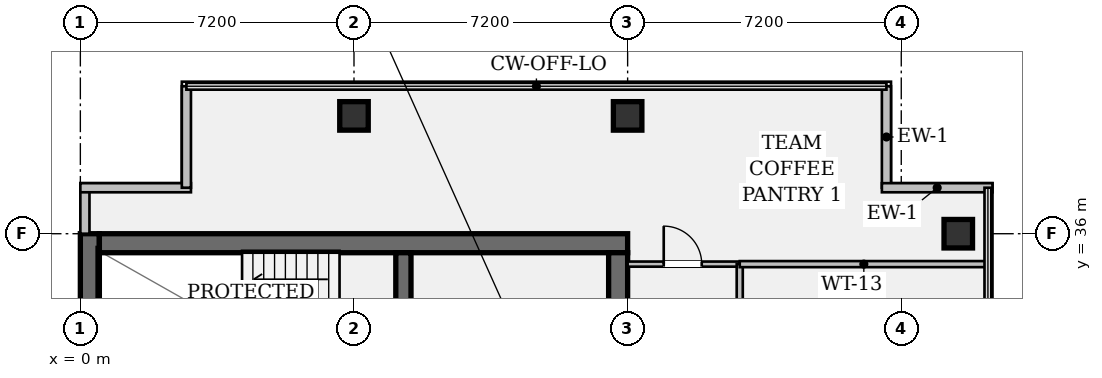
"""IFC4 building model, lengths in metres.
Left out: names, types, materials, properties, quantities, classifications, styles, units other than length and angle.
Written with IfcOpenShell. Run it as: python <this file> out.ifc"""

import sys

from ifc_helpers import new_model, si_unit, direction, frame, frame_2d, origin, origin_2d, place, context, subcontext, project, spatial, rectangle, hollow_rectangle, extrude, element, fill, save


model = new_model("IFC4")
c1 = context("Model", 3, precision=1e-05, world=origin(), true_north=direction((0.0, 1.0)))
c2 = subcontext(c1, "Body", "Model", "MODEL_VIEW")
j1 = project(units=[si_unit("LENGTHUNIT", "METRE"), si_unit("PLANEANGLEUNIT", "RADIAN")], contexts=[c1])
p1 = place(None, origin())
s1 = spatial("IfcSite", under=j1, at=p1, CompositionType="ELEMENT")
p2 = place(p1, origin())
s2 = spatial("IfcBuilding", under=s1, at=p2, CompositionType="ELEMENT")
p3 = place(p2, frame((0.0, 0.0, 222.25)))
s3 = spatial("IfcBuildingStorey", under=s2, at=p3, CompositionType="ELEMENT", Elevation=222.25)
p4 = place(p3, frame((0.25, 7.2, 0.0), z_axis=(0.0, 0.0, 1.0), x_axis=(0.0, 1.0, 0.0)))
e1 = element("IfcWall", 1, at=p4, inside=s3, PredefinedType="SHEAR", context=c2, shape_type="SweptSolid", body=[
    extrude(rectangle(XDim=28.8, YDim=0.5, at=frame_2d((14.4, 0.0))), origin(), (0.0, 0.0, 1.0), 3.24),
])
p5 = place(p3, frame((0.5, 35.75, 0.0), z_axis=(0.0, 0.0, 1.0), x_axis=(1.0, 0.0, 0.0)))
e2 = element("IfcWall", 2, at=p5, inside=s3, PredefinedType="SHEAR", context=c2, shape_type="SweptSolid", body=[
    extrude(rectangle(XDim=13.9, YDim=0.5, at=frame_2d((6.95, 0.0))), origin(), (0.0, 0.0, 1.0), 3.24),
])
p6 = place(p3, frame((14.15, 35.5, 0.0), z_axis=(0.0, 0.0, 1.0), x_axis=(0.0, -1.0, 0.0)))
e3 = element("IfcWall", 3, at=p6, inside=s3, PredefinedType="SHEAR", context=c2, shape_type="SweptSolid", body=[
    extrude(rectangle(XDim=27.8, YDim=0.5, at=frame_2d((13.9, 0.0))), origin(), (0.0, 0.0, 1.0), 3.24),
])
p7 = place(p6, frame((1.4, 0.0, 0.0)))
e4 = element("IfcOpeningElement", 4, at=p7, cuts=e3, PredefinedType="OPENING", context=c2, shape_type="SweptSolid", body=[
    extrude(rectangle(XDim=1.2, YDim=2.15, at=frame_2d((0.6, 1.075))), frame((0.0, 0.262, 0.0), z_axis=(0.0, -1.0, 0.0), x_axis=(1.0, 0.0, 0.0)), (0.0, 0.0, 1.0), 0.524),
])
p8 = place(p6, frame((25.35, 0.0, 0.0)))
e5 = element("IfcOpeningElement", 5, at=p8, cuts=e3, PredefinedType="OPENING", context=c2, shape_type="SweptSolid", body=[
    extrude(rectangle(XDim=1.2, YDim=2.15, at=frame_2d((0.6, 1.075))), frame((0.0, 0.262, 0.0), z_axis=(0.0, -1.0, 0.0), x_axis=(1.0, 0.0, 0.0)), (0.0, 0.0, 1.0), 0.524),
])
p9 = place(p6, frame((14.7, 0.0, 0.0)))
e6 = element("IfcOpeningElement", 6, at=p9, cuts=e3, PredefinedType="OPENING", context=c2, shape_type="SweptSolid", body=[
    extrude(rectangle(XDim=1.6, YDim=2.2, at=frame_2d((0.8, 1.1))), frame((0.0, 0.262, 0.0), z_axis=(0.0, -1.0, 0.0), x_axis=(1.0, 0.0, 0.0)), (0.0, 0.0, 1.0), 0.524),
])
p10 = place(p3, frame((8.5, 31.72, 0.0), z_axis=(0.0, 0.0, 1.0), x_axis=(0.0, 1.0, 0.0)))
e7 = element("IfcWall", 7, at=p10, inside=s3, PredefinedType="SHEAR", context=c2, shape_type="SweptSolid", body=[
    extrude(rectangle(XDim=3.78, YDim=0.4, at=frame_2d((1.89, 0.0))), origin(), (0.0, 0.0, 1.0), 3.24),
])
p11 = place(p10, frame((0.9, 0.0, 0.0)))
e8 = element("IfcOpeningElement", 8, at=p11, cuts=e7, PredefinedType="OPENING", context=c2, shape_type="SweptSolid", body=[
    extrude(rectangle(XDim=1.1, YDim=2.15, at=frame_2d((0.55, 1.075))), frame((0.0, 0.212, 0.0), z_axis=(0.0, -1.0, 0.0), x_axis=(1.0, 0.0, 0.0)), (0.0, 0.0, 1.0), 0.424),
])
for number, where, z_axis, x_axis in (
    (9, (7.2, 39.1, 0.0), (0.0, 0.0, 1.0), (1.0, 0.0, 0.0)),
    (10, (14.4, 39.1, 0.0), (0.0, 0.0, 1.0), (1.0, 0.0, 0.0)),
    (11, (23.1, 36.0, 0.0), (0.0, 0.0, 1.0), (1.0, 0.0, 0.0)),
):
    element("IfcColumn", number, at=place(p3, frame(where, z_axis=z_axis, x_axis=x_axis)), inside=s3, PredefinedType="COLUMN", context=c2, shape_type="SweptSolid", body=[
        extrude(hollow_rectangle(XDim=0.75, YDim=0.75, WallThickness=0.045, at=origin_2d()), origin(), (0.0, 0.0, 1.0), 3.24),
    ])
p12 = place(p3, frame((0.12, 36.0, 0.0), z_axis=(0.0, 0.0, 1.0), x_axis=(0.0, 1.0, 0.0)))
e12 = element("IfcWall", 12, at=p12, inside=s3, PredefinedType="STANDARD", context=c2, shape_type="SweptSolid", body=[
    extrude(rectangle(XDim=1.21, YDim=0.24, at=frame_2d((0.605, 0.0))), origin(), (0.0, 0.0, 1.0), 3.24),
])
p13 = place(p3, frame((0.0, 37.21, 0.0), z_axis=(0.0, 0.0, 1.0), x_axis=(1.0, 0.0, 0.0)))
e13 = element("IfcWall", 13, at=p13, inside=s3, PredefinedType="STANDARD", context=c2, shape_type="SweptSolid", body=[
    extrude(rectangle(XDim=2.91, YDim=0.24, at=frame_2d((1.455, 0.0))), origin(), (0.0, 0.0, 1.0), 3.24),
])
for number, where, z_axis, x_axis in (
    (14, (2.79, 37.21, 0.0), (0.0, 0.0, 1.0), (0.0, 1.0, 0.0)),
    (15, (21.21, 39.88, 0.0), (0.0, 0.0, 1.0), (0.0, -1.0, 0.0)),
):
    element("IfcWall", number, at=place(p3, frame(where, z_axis=z_axis, x_axis=x_axis)), inside=s3, PredefinedType="STANDARD", context=c2, shape_type="SweptSolid", body=[
        extrude(rectangle(XDim=2.67, YDim=0.24, at=frame_2d((1.335, 0.0))), origin(), (0.0, 0.0, 1.0), 3.24),
    ])
p14 = place(p3, frame((21.09, 37.21, 0.0), z_axis=(0.0, 0.0, 1.0), x_axis=(1.0, 0.0, 0.0)))
e16 = element("IfcWall", 16, at=p14, inside=s3, PredefinedType="STANDARD", context=c2, shape_type="SweptSolid", body=[
    extrude(rectangle(XDim=2.91, YDim=0.24, at=frame_2d((1.455, 0.0))), origin(), (0.0, 0.0, 1.0), 3.24),
])
p15 = place(p3, frame((14.4, 35.2, 0.0), z_axis=(0.0, 0.0, 1.0), x_axis=(1.0, 0.0, 0.0)))
e17 = element("IfcWall", 17, at=p15, inside=s3, PredefinedType="PARTITIONING", context=c2, shape_type="SweptSolid", body=[
    extrude(rectangle(XDim=2.95, YDim=0.135, at=frame_2d((1.475, 0.0))), origin(), (0.0, 0.0, 1.0), 2.808),
])
p16 = place(p15, frame((0.95, 0.0, 0.0)))
e18 = element("IfcOpeningElement", 18, at=p16, cuts=e17, PredefinedType="OPENING", context=c2, shape_type="SweptSolid", body=[
    extrude(rectangle(XDim=1.0, YDim=2.15, at=frame_2d((0.5, 1.075))), frame((0.0, 0.08, 0.0), z_axis=(0.0, -1.0, 0.0), x_axis=(1.0, 0.0, 0.0)), (0.0, 0.0, 1.0), 0.159),
])
p17 = place(p3, frame((17.35, 12.75, 0.0), z_axis=(0.0, 0.0, 1.0), x_axis=(0.0, 1.0, 0.0)))
e19 = element("IfcWall", 19, at=p17, inside=s3, PredefinedType="PARTITIONING", context=c2, shape_type="SweptSolid", body=[
    extrude(rectangle(XDim=22.45, YDim=0.16, at=frame_2d((11.225, 0.0))), origin(), (0.0, 0.0, 1.0), 2.613),
])
p18 = place(p17, frame((4.3, 0.0, 0.0)))
e20 = element("IfcOpeningElement", 20, at=p18, cuts=e19, PredefinedType="OPENING", context=c2, shape_type="SweptSolid", body=[
    extrude(rectangle(XDim=1.08, YDim=2.15, at=frame_2d((0.54, 1.075))), frame((0.0, 0.092, 0.0), z_axis=(0.0, -1.0, 0.0), x_axis=(1.0, 0.0, 0.0)), (0.0, 0.0, 1.0), 0.184),
])
p19 = place(p17, frame((8.0, 0.0, 0.0)))
e21 = element("IfcOpeningElement", 21, at=p19, cuts=e19, PredefinedType="OPENING", context=c2, shape_type="SweptSolid", body=[
    extrude(rectangle(XDim=1.08, YDim=2.15, at=frame_2d((0.54, 1.075))), frame((0.0, 0.092, 0.0), z_axis=(0.0, -1.0, 0.0), x_axis=(1.0, 0.0, 0.0)), (0.0, 0.0, 1.0), 0.184),
])
p20 = place(p17, frame((16.02, 0.0, 0.0)))
e22 = element("IfcOpeningElement", 22, at=p20, cuts=e19, PredefinedType="OPENING", context=c2, shape_type="SweptSolid", body=[
    extrude(rectangle(XDim=1.08, YDim=2.15, at=frame_2d((0.54, 1.075))), frame((0.0, 0.092, 0.0), z_axis=(0.0, -1.0, 0.0), x_axis=(1.0, 0.0, 0.0)), (0.0, 0.0, 1.0), 0.184),
])
p21 = place(p3, frame((17.35, 35.2, 0.0), z_axis=(0.0, 0.0, 1.0), x_axis=(1.0, 0.0, 0.0)))
e23 = element("IfcWall", 23, at=p21, inside=s3, PredefinedType="PARTITIONING", context=c2, shape_type="SweptSolid", body=[
    extrude(rectangle(XDim=6.53, YDim=0.16, at=frame_2d((3.265, 0.0))), origin(), (0.0, 0.0, 1.0), 2.808),
])
p22 = place(p16, origin())
e24 = element("IfcDoor", 24, at=p22, inside=s3, OperationType="SINGLE_SWING_LEFT", PredefinedType="DOOR", context=c2, shape_type="SweptSolid", body=[
    extrude(rectangle(XDim=1.0, YDim=2.15, at=frame_2d((0.5, 1.075))), frame((0.0, 0.025, 0.0), z_axis=(0.0, -1.0, 0.0), x_axis=(1.0, 0.0, 0.0)), (0.0, 0.0, 1.0), 0.05),
])
fill(e18, e24)
save(model, sys.argv[1])
